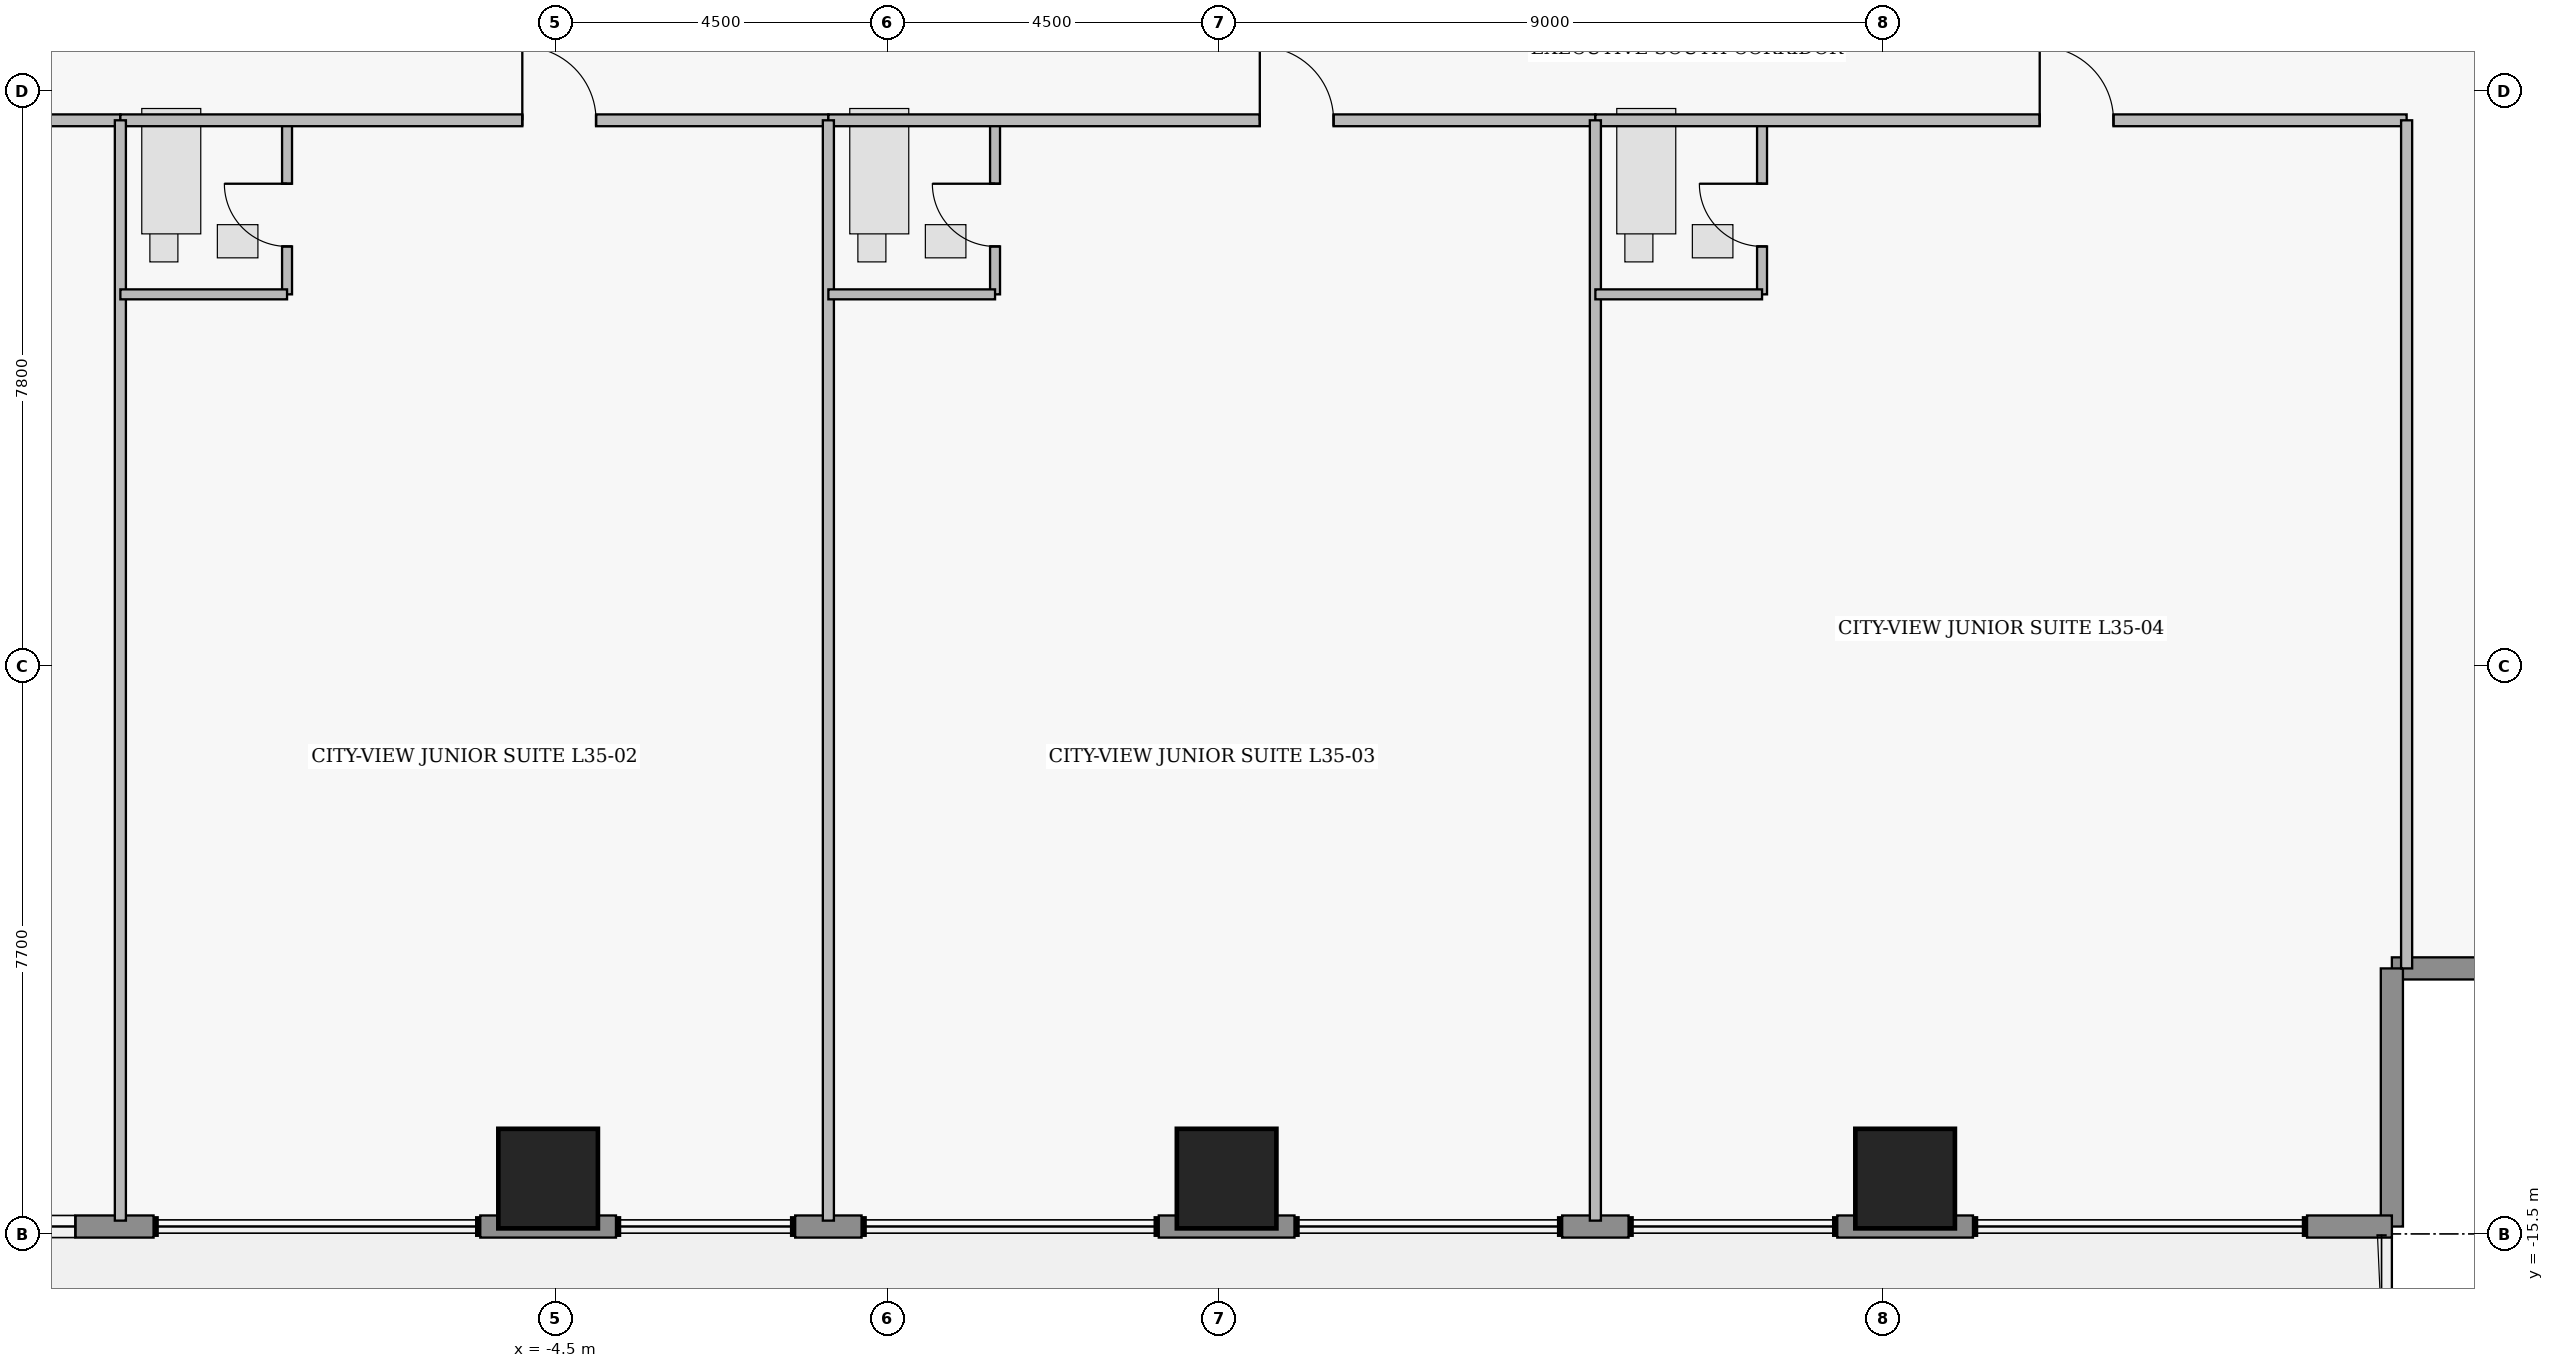
"""IFC4 building model, lengths in metres.
Left out: names, types, materials, properties, quantities, classifications, styles, units other than length and angle.
Written with IfcOpenShell. Run it as: python <this file> out.ifc"""

import sys

from ifc_helpers import new_model, si_unit, direction, frame, frame_2d, origin, origin_2d, place, context, subcontext, project, spatial, rectangle, extrude, element, fill, save


model = new_model("IFC4")
c1 = context("Model", 3, precision=1e-05, world=origin(), true_north=direction((0.0, 1.0)))
c2 = subcontext(c1, "Body", "Model", "MODEL_VIEW")
j1 = project(units=[si_unit("LENGTHUNIT", "METRE"), si_unit("PLANEANGLEUNIT", "RADIAN")], contexts=[c1])
p1 = place(None, origin())
s1 = spatial("IfcSite", under=j1, at=p1, CompositionType="ELEMENT")
p2 = place(p1, origin())
s2 = spatial("IfcBuilding", under=s1, at=p2, CompositionType="ELEMENT")
p3 = place(p2, frame((0.0, 0.0, 139.45)))
s3 = spatial("IfcBuildingStorey", under=s2, at=p3, CompositionType="ELEMENT", Elevation=139.45)
for number, where, z_axis, x_axis in (
    (1, (-4.6, -14.75, 0.0), (0.0, 0.0, 1.0), (1.0, 0.0, 0.0)),
    (2, (4.6, -14.75, 0.0), (0.0, 0.0, 1.0), (1.0, 0.0, 0.0)),
    (3, (13.8, -14.75, 0.0), (0.0, 0.0, 1.0), (1.0, 0.0, 0.0)),
):
    element("IfcColumn", number, at=place(p3, frame(where, z_axis=z_axis, x_axis=x_axis)), inside=s3, PredefinedType="COLUMN", context=c2, shape_type="SweptSolid", body=[
        extrude(rectangle(XDim=1.35, YDim=1.35, at=origin_2d()), origin(), (0.0, 0.0, 1.0), 3.65),
    ])
for number, where, z_axis, x_axis in (
    (4, (23.9, -11.9, 0.0), (0.0, 0.0, 1.0), (-1.0, 0.0, 0.0)),
    (5, (20.4, -11.9, 0.0), (0.0, 0.0, 1.0), (0.0, -1.0, 0.0)),
):
    element("IfcWall", number, at=place(p3, frame(where, z_axis=z_axis, x_axis=x_axis)), inside=s3, PredefinedType="STANDARD", context=c2, shape_type="SweptSolid", body=[
        extrude(rectangle(XDim=3.5, YDim=0.3, at=frame_2d((1.75, 0.0))), origin(), (0.0, 0.0, 1.0), 3.43),
    ])
p4 = place(p3, frame((20.4, -15.4, 0.0), z_axis=(0.0, 0.0, 1.0), x_axis=(-1.0, 0.0, 0.0)))
e6 = element("IfcWall", 6, at=p4, inside=s3, PredefinedType="STANDARD", context=c2, shape_type="SweptSolid", body=[
    extrude(rectangle(XDim=1.15, YDim=0.3, at=frame_2d((0.575, 0.0))), origin(), (0.0, 0.0, 1.0), 3.43),
])
p5 = place(p3, frame((14.72, -15.4, 0.0), z_axis=(0.0, 0.0, 1.0), x_axis=(-1.0, 0.0, 0.0)))
e7 = element("IfcWall", 7, at=p5, inside=s3, PredefinedType="STANDARD", context=c2, shape_type="SweptSolid", body=[
    extrude(rectangle(XDim=1.84, YDim=0.3, at=frame_2d((0.92, 0.0))), origin(), (0.0, 0.0, 1.0), 3.43),
])
p6 = place(p3, frame((10.05, -15.4, 0.0), z_axis=(0.0, 0.0, 1.0), x_axis=(-1.0, 0.0, 0.0)))
e8 = element("IfcWall", 8, at=p6, inside=s3, PredefinedType="STANDARD", context=c2, shape_type="SweptSolid", body=[
    extrude(rectangle(XDim=0.9, YDim=0.3, at=frame_2d((0.45, 0.0))), origin(), (0.0, 0.0, 1.0), 3.43),
])
p7 = place(p3, frame((5.52, -15.4, 0.0), z_axis=(0.0, 0.0, 1.0), x_axis=(-1.0, 0.0, 0.0)))
e9 = element("IfcWall", 9, at=p7, inside=s3, PredefinedType="STANDARD", context=c2, shape_type="SweptSolid", body=[
    extrude(rectangle(XDim=1.84, YDim=0.3, at=frame_2d((0.92, 0.0))), origin(), (0.0, 0.0, 1.0), 3.43),
])
p8 = place(p3, frame((-0.35, -15.4, 0.0), z_axis=(0.0, 0.0, 1.0), x_axis=(-1.0, 0.0, 0.0)))
e10 = element("IfcWall", 10, at=p8, inside=s3, PredefinedType="STANDARD", context=c2, shape_type="SweptSolid", body=[
    extrude(rectangle(XDim=0.9, YDim=0.3, at=frame_2d((0.45, 0.0))), origin(), (0.0, 0.0, 1.0), 3.43),
])
p9 = place(p3, frame((-3.68, -15.4, 0.0), z_axis=(0.0, 0.0, 1.0), x_axis=(-1.0, 0.0, 0.0)))
e11 = element("IfcWall", 11, at=p9, inside=s3, PredefinedType="STANDARD", context=c2, shape_type="SweptSolid", body=[
    extrude(rectangle(XDim=1.84, YDim=0.3, at=frame_2d((0.92, 0.0))), origin(), (0.0, 0.0, 1.0), 3.43),
])
p10 = place(p3, frame((-9.95, -15.4, 0.0), z_axis=(0.0, 0.0, 1.0), x_axis=(-1.0, 0.0, 0.0)))
e12 = element("IfcWall", 12, at=p10, inside=s3, PredefinedType="STANDARD", context=c2, shape_type="SweptSolid", body=[
    extrude(rectangle(XDim=10.45, YDim=0.3, at=frame_2d((5.225, 0.0))), origin(), (0.0, 0.0, 1.0), 3.43),
])
p11 = place(p10, frame((7.065, 0.0, 0.0)))
e13 = element("IfcOpeningElement", 13, at=p11, cuts=e12, PredefinedType="OPENING", context=c2, shape_type="SweptSolid", body=[
    extrude(rectangle(XDim=1.05, YDim=2.2, at=frame_2d((0.525, 1.1))), frame((0.0, 0.16, 0.0), z_axis=(0.0, -1.0, 0.0), x_axis=(1.0, 0.0, 0.0)), (0.0, 0.0, 1.0), 0.32),
])
p12 = place(p10, frame((1.06, 0.0, 0.85)))
e14 = element("IfcOpeningElement", 14, at=p12, cuts=e12, PredefinedType="OPENING", context=c2, shape_type="SweptSolid", body=[
    extrude(rectangle(XDim=1.6, YDim=1.8, at=frame_2d((0.8, 0.9))), frame((0.0, 0.16, 0.0), z_axis=(0.0, -1.0, 0.0), x_axis=(1.0, 0.0, 0.0)), (0.0, 0.0, 1.0), 0.32),
])
p13 = place(p10, frame((5.107, 0.0, 0.95)))
e15 = element("IfcOpeningElement", 15, at=p13, cuts=e12, PredefinedType="OPENING", context=c2, shape_type="SweptSolid", body=[
    extrude(rectangle(XDim=1.15, YDim=1.55, at=frame_2d((0.575, 0.775))), frame((0.0, 0.16, 0.0), z_axis=(0.0, -1.0, 0.0), x_axis=(1.0, 0.0, 0.0)), (0.0, 0.0, 1.0), 0.32),
])
p14 = place(p10, frame((8.712, 0.0, 0.95)))
e16 = element("IfcOpeningElement", 16, at=p14, cuts=e12, PredefinedType="OPENING", context=c2, shape_type="SweptSolid", body=[
    extrude(rectangle(XDim=1.15, YDim=1.55, at=frame_2d((0.575, 0.775))), frame((0.0, 0.16, 0.0), z_axis=(0.0, -1.0, 0.0), x_axis=(1.0, 0.0, 0.0)), (0.0, 0.0, 1.0), 0.32),
])
p15 = place(p3, frame((-20.6, -0.4, 0.0), z_axis=(0.0, 0.0, 1.0), x_axis=(1.0, 0.0, 0.0)))
e17 = element("IfcWall", 17, at=p15, inside=s3, PredefinedType="PARTITIONING", context=c2, shape_type="SweptSolid", body=[
    extrude(rectangle(XDim=10.2, YDim=0.16, at=frame_2d((5.1, 0.0))), origin(), (0.0, 0.0, 1.0), 3.43),
])
p16 = place(p15, frame((5.75, 0.0, 0.0)))
e18 = element("IfcOpeningElement", 18, at=p16, cuts=e17, PredefinedType="OPENING", context=c2, shape_type="SweptSolid", body=[
    extrude(rectangle(XDim=1.0, YDim=2.15, at=frame_2d((0.5, 1.075))), frame((0.0, 0.09, 0.0), z_axis=(0.0, -1.0, 0.0), x_axis=(1.0, 0.0, 0.0)), (0.0, 0.0, 1.0), 0.18),
])
p17 = place(p3, frame((-8.14, -2.76, 0.0), z_axis=(0.0, 0.0, 1.0), x_axis=(0.0, 1.0, 0.0)))
e19 = element("IfcWall", 19, at=p17, inside=s3, PredefinedType="PLUMBINGWALL", context=c2, shape_type="SweptSolid", body=[
    extrude(rectangle(XDim=2.36, YDim=0.135, at=frame_2d((1.18, 0.0))), origin(), (0.0, 0.0, 1.0), 3.43),
])
p18 = place(p17, frame((0.65, 0.0, 0.0)))
e20 = element("IfcOpeningElement", 20, at=p18, cuts=e19, PredefinedType="OPENING", context=c2, shape_type="SweptSolid", body=[
    extrude(rectangle(XDim=0.85, YDim=2.1, at=frame_2d((0.425, 1.05))), frame((0.0, 0.077, 0.0), z_axis=(0.0, -1.0, 0.0), x_axis=(1.0, 0.0, 0.0)), (0.0, 0.0, 1.0), 0.155),
])
p19 = place(p3, frame((-10.4, -0.4, 0.0), z_axis=(0.0, 0.0, 1.0), x_axis=(1.0, 0.0, 0.0)))
e21 = element("IfcWall", 21, at=p19, inside=s3, PredefinedType="PARTITIONING", context=c2, shape_type="SweptSolid", body=[
    extrude(rectangle(XDim=9.6, YDim=0.16, at=frame_2d((4.8, 0.0))), origin(), (0.0, 0.0, 1.0), 3.43),
])
p20 = place(p19, frame((5.45, 0.0, 0.0)))
e22 = element("IfcOpeningElement", 22, at=p20, cuts=e21, PredefinedType="OPENING", context=c2, shape_type="SweptSolid", body=[
    extrude(rectangle(XDim=1.0, YDim=2.15, at=frame_2d((0.5, 1.075))), frame((0.0, 0.09, 0.0), z_axis=(0.0, -1.0, 0.0), x_axis=(1.0, 0.0, 0.0)), (0.0, 0.0, 1.0), 0.18),
])
p21 = place(p3, frame((1.46, -2.76, 0.0), z_axis=(0.0, 0.0, 1.0), x_axis=(0.0, 1.0, 0.0)))
e23 = element("IfcWall", 23, at=p21, inside=s3, PredefinedType="PLUMBINGWALL", context=c2, shape_type="SweptSolid", body=[
    extrude(rectangle(XDim=2.36, YDim=0.135, at=frame_2d((1.18, 0.0))), origin(), (0.0, 0.0, 1.0), 3.43),
])
p22 = place(p21, frame((0.65, 0.0, 0.0)))
e24 = element("IfcOpeningElement", 24, at=p22, cuts=e23, PredefinedType="OPENING", context=c2, shape_type="SweptSolid", body=[
    extrude(rectangle(XDim=0.85, YDim=2.1, at=frame_2d((0.425, 1.05))), frame((0.0, 0.077, 0.0), z_axis=(0.0, -1.0, 0.0), x_axis=(1.0, 0.0, 0.0)), (0.0, 0.0, 1.0), 0.155),
])
p23 = place(p3, frame((-0.8, -0.4, 0.0), z_axis=(0.0, 0.0, 1.0), x_axis=(1.0, 0.0, 0.0)))
e25 = element("IfcWall", 25, at=p23, inside=s3, PredefinedType="PARTITIONING", context=c2, shape_type="SweptSolid", body=[
    extrude(rectangle(XDim=10.4, YDim=0.16, at=frame_2d((5.2, 0.0))), origin(), (0.0, 0.0, 1.0), 3.43),
])
p24 = place(p23, frame((5.85, 0.0, 0.0)))
e26 = element("IfcOpeningElement", 26, at=p24, cuts=e25, PredefinedType="OPENING", context=c2, shape_type="SweptSolid", body=[
    extrude(rectangle(XDim=1.0, YDim=2.15, at=frame_2d((0.5, 1.075))), frame((0.0, 0.09, 0.0), z_axis=(0.0, -1.0, 0.0), x_axis=(1.0, 0.0, 0.0)), (0.0, 0.0, 1.0), 0.18),
])
p25 = place(p3, frame((11.86, -2.76, 0.0), z_axis=(0.0, 0.0, 1.0), x_axis=(0.0, 1.0, 0.0)))
e27 = element("IfcWall", 27, at=p25, inside=s3, PredefinedType="PLUMBINGWALL", context=c2, shape_type="SweptSolid", body=[
    extrude(rectangle(XDim=2.36, YDim=0.135, at=frame_2d((1.18, 0.0))), origin(), (0.0, 0.0, 1.0), 3.43),
])
p26 = place(p25, frame((0.65, 0.0, 0.0)))
e28 = element("IfcOpeningElement", 28, at=p26, cuts=e27, PredefinedType="OPENING", context=c2, shape_type="SweptSolid", body=[
    extrude(rectangle(XDim=0.85, YDim=2.1, at=frame_2d((0.425, 1.05))), frame((0.0, 0.077, 0.0), z_axis=(0.0, -1.0, 0.0), x_axis=(1.0, 0.0, 0.0)), (0.0, 0.0, 1.0), 0.155),
])
p27 = place(p3, frame((9.6, -0.4, 0.0), z_axis=(0.0, 0.0, 1.0), x_axis=(1.0, 0.0, 0.0)))
e29 = element("IfcWall", 29, at=p27, inside=s3, PredefinedType="PARTITIONING", context=c2, shape_type="SweptSolid", body=[
    extrude(rectangle(XDim=11.0, YDim=0.16, at=frame_2d((5.5, 0.0))), origin(), (0.0, 0.0, 1.0), 3.43),
])
p28 = place(p27, frame((6.025, 0.0, 0.0)))
e30 = element("IfcOpeningElement", 30, at=p28, cuts=e29, PredefinedType="OPENING", context=c2, shape_type="SweptSolid", body=[
    extrude(rectangle(XDim=1.0, YDim=2.15, at=frame_2d((0.5, 1.075))), frame((0.0, 0.09, 0.0), z_axis=(0.0, -1.0, 0.0), x_axis=(1.0, 0.0, 0.0)), (0.0, 0.0, 1.0), 0.18),
])
p29 = place(p3, frame((-10.4, -15.32, 0.0), z_axis=(0.0, 0.0, 1.0), x_axis=(0.0, 1.0, 0.0)))
e31 = element("IfcWall", 31, at=p29, inside=s3, PredefinedType="PARTITIONING", context=c2, shape_type="SweptSolid", body=[
    extrude(rectangle(XDim=14.92, YDim=0.15, at=frame_2d((7.46, 0.0))), origin(), (0.0, 0.0, 1.0), 3.43),
])
p30 = place(p3, frame((-10.4, -2.76, 0.0), z_axis=(0.0, 0.0, 1.0), x_axis=(1.0, 0.0, 0.0)))
e32 = element("IfcWall", 32, at=p30, inside=s3, PredefinedType="PLUMBINGWALL", context=c2, shape_type="SweptSolid", body=[
    extrude(rectangle(XDim=2.26, YDim=0.135, at=frame_2d((1.13, 0.0))), origin(), (0.0, 0.0, 1.0), 3.43),
])
p31 = place(p3, frame((-0.8, -15.32, 0.0), z_axis=(0.0, 0.0, 1.0), x_axis=(0.0, 1.0, 0.0)))
e33 = element("IfcWall", 33, at=p31, inside=s3, PredefinedType="PARTITIONING", context=c2, shape_type="SweptSolid", body=[
    extrude(rectangle(XDim=14.92, YDim=0.15, at=frame_2d((7.46, 0.0))), origin(), (0.0, 0.0, 1.0), 3.43),
])
p32 = place(p3, frame((-0.8, -2.76, 0.0), z_axis=(0.0, 0.0, 1.0), x_axis=(1.0, 0.0, 0.0)))
e34 = element("IfcWall", 34, at=p32, inside=s3, PredefinedType="PLUMBINGWALL", context=c2, shape_type="SweptSolid", body=[
    extrude(rectangle(XDim=2.26, YDim=0.135, at=frame_2d((1.13, 0.0))), origin(), (0.0, 0.0, 1.0), 3.43),
])
p33 = place(p3, frame((9.6, -15.32, 0.0), z_axis=(0.0, 0.0, 1.0), x_axis=(0.0, 1.0, 0.0)))
e35 = element("IfcWall", 35, at=p33, inside=s3, PredefinedType="PARTITIONING", context=c2, shape_type="SweptSolid", body=[
    extrude(rectangle(XDim=14.92, YDim=0.15, at=frame_2d((7.46, 0.0))), origin(), (0.0, 0.0, 1.0), 3.43),
])
p34 = place(p3, frame((9.6, -2.76, 0.0), z_axis=(0.0, 0.0, 1.0), x_axis=(1.0, 0.0, 0.0)))
e36 = element("IfcWall", 36, at=p34, inside=s3, PredefinedType="PLUMBINGWALL", context=c2, shape_type="SweptSolid", body=[
    extrude(rectangle(XDim=2.26, YDim=0.135, at=frame_2d((1.13, 0.0))), origin(), (0.0, 0.0, 1.0), 3.43),
])
p35 = place(p3, frame((20.6, -11.9, 0.0), z_axis=(0.0, 0.0, 1.0), x_axis=(0.0, 1.0, 0.0)))
e37 = element("IfcWall", 37, at=p35, inside=s3, PredefinedType="PARTITIONING", context=c2, shape_type="SweptSolid", body=[
    extrude(rectangle(XDim=11.5, YDim=0.15, at=frame_2d((5.75, 0.0))), origin(), (0.0, 0.0, 1.0), 3.43),
])
p36 = place(p12, origin())
e38 = element("IfcWindow", 38, at=p36, inside=s3, PartitioningType="SINGLE_PANEL", PredefinedType="WINDOW", context=c2, shape_type="SweptSolid", body=[
    extrude(rectangle(XDim=1.6, YDim=1.8, at=frame_2d((0.8, 0.9))), frame((0.0, 0.03, 0.0), z_axis=(0.0, -1.0, 0.0), x_axis=(1.0, 0.0, 0.0)), (0.0, 0.0, 1.0), 0.06),
])
fill(e14, e38)
p37 = place(p18, origin())
e39 = element("IfcDoor", 39, at=p37, inside=s3, OperationType="SINGLE_SWING_RIGHT", PredefinedType="DOOR", context=c2, shape_type="SweptSolid", body=[
    extrude(rectangle(XDim=0.85, YDim=2.1, at=frame_2d((0.425, 1.05))), frame((0.0, 0.025, 0.0), z_axis=(0.0, -1.0, 0.0), x_axis=(1.0, 0.0, 0.0)), (0.0, 0.0, 1.0), 0.05),
])
fill(e20, e39)
p38 = place(p20, origin())
e40 = element("IfcDoor", 40, at=p38, inside=s3, OperationType="SINGLE_SWING_LEFT", PredefinedType="DOOR", context=c2, shape_type="SweptSolid", body=[
    extrude(rectangle(XDim=1.0, YDim=2.15, at=frame_2d((0.5, 1.075))), frame((0.0, 0.025, 0.0), z_axis=(0.0, -1.0, 0.0), x_axis=(1.0, 0.0, 0.0)), (0.0, 0.0, 1.0), 0.05),
])
fill(e22, e40)
p39 = place(p22, origin())
e41 = element("IfcDoor", 41, at=p39, inside=s3, OperationType="SINGLE_SWING_RIGHT", PredefinedType="DOOR", context=c2, shape_type="SweptSolid", body=[
    extrude(rectangle(XDim=0.85, YDim=2.1, at=frame_2d((0.425, 1.05))), frame((0.0, 0.025, 0.0), z_axis=(0.0, -1.0, 0.0), x_axis=(1.0, 0.0, 0.0)), (0.0, 0.0, 1.0), 0.05),
])
fill(e24, e41)
p40 = place(p24, origin())
e42 = element("IfcDoor", 42, at=p40, inside=s3, OperationType="SINGLE_SWING_LEFT", PredefinedType="DOOR", context=c2, shape_type="SweptSolid", body=[
    extrude(rectangle(XDim=1.0, YDim=2.15, at=frame_2d((0.5, 1.075))), frame((0.0, 0.025, 0.0), z_axis=(0.0, -1.0, 0.0), x_axis=(1.0, 0.0, 0.0)), (0.0, 0.0, 1.0), 0.05),
])
fill(e26, e42)
p41 = place(p26, origin())
e43 = element("IfcDoor", 43, at=p41, inside=s3, OperationType="SINGLE_SWING_RIGHT", PredefinedType="DOOR", context=c2, shape_type="SweptSolid", body=[
    extrude(rectangle(XDim=0.85, YDim=2.1, at=frame_2d((0.425, 1.05))), frame((0.0, 0.025, 0.0), z_axis=(0.0, -1.0, 0.0), x_axis=(1.0, 0.0, 0.0)), (0.0, 0.0, 1.0), 0.05),
])
fill(e28, e43)
p42 = place(p28, origin())
e44 = element("IfcDoor", 44, at=p42, inside=s3, OperationType="SINGLE_SWING_LEFT", PredefinedType="DOOR", context=c2, shape_type="SweptSolid", body=[
    extrude(rectangle(XDim=1.0, YDim=2.15, at=frame_2d((0.5, 1.075))), frame((0.0, 0.025, 0.0), z_axis=(0.0, -1.0, 0.0), x_axis=(1.0, 0.0, 0.0)), (0.0, 0.0, 1.0), 0.05),
])
fill(e30, e44)
save(model, sys.argv[1])
